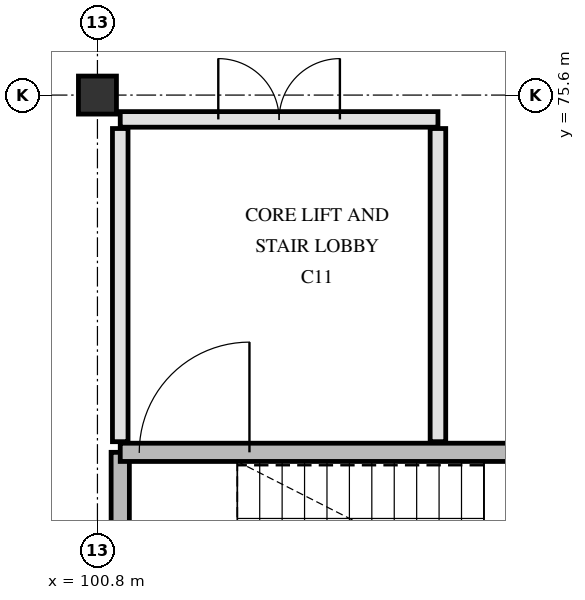
"""IFC4 building model, lengths in metres.
Left out: names, types, materials, properties, quantities, classifications, styles, units other than length and angle.
Written with IfcOpenShell. Run it as: python <this file> out.ifc"""

import sys

from ifc_helpers import new_model, si_unit, direction, frame, frame_2d, origin, origin_2d, place, context, subcontext, project, spatial, rectangle, extrude, element, fill, save


model = new_model("IFC4")
c1 = context("Model", 3, precision=1e-05, world=origin(), true_north=direction((0.0, 1.0)))
c2 = subcontext(c1, "Body", "Model", "MODEL_VIEW")
j1 = project(units=[si_unit("LENGTHUNIT", "METRE"), si_unit("PLANEANGLEUNIT", "RADIAN")], contexts=[c1])
p1 = place(None, origin())
s1 = spatial("IfcSite", under=j1, at=p1, CompositionType="ELEMENT")
p2 = place(p1, origin())
s2 = spatial("IfcBuilding", under=s1, at=p2, CompositionType="ELEMENT")
p3 = place(p2, frame((0.0, 0.0, 26.4)))
s3 = spatial("IfcBuildingStorey", under=s2, at=p3, CompositionType="ELEMENT", Elevation=26.4)
p4 = place(p3, frame((100.8, 75.6, 0.0), z_axis=(0.0, 0.0, 1.0), x_axis=(1.0, 0.0, 0.0)))
e1 = element("IfcColumn", 1, at=p4, inside=s3, PredefinedType="COLUMN", context=c2, shape_type="SweptSolid", body=[
    extrude(rectangle(XDim=0.5, YDim=0.5, at=origin_2d()), origin(), (0.0, 0.0, 1.0), 3.9),
])
p5 = place(p3, frame((101.1, 67.58, 0.0), z_axis=(0.0, 0.0, 1.0), x_axis=(0.0, 1.0, 0.0)))
e2 = element("IfcWall", 2, at=p5, inside=s3, PredefinedType="SHEAR", context=c2, shape_type="SweptSolid", body=[
    extrude(rectangle(XDim=3.32, YDim=0.24, at=frame_2d((1.66, 0.0))), origin(), (0.0, 0.0, 1.0), 3.62),
])
p6 = place(p3, frame((101.1, 70.9, 0.0), z_axis=(0.0, 0.0, 1.0), x_axis=(1.0, 0.0, 0.0)))
e3 = element("IfcWall", 3, at=p6, inside=s3, PredefinedType="SHEAR", context=c2, shape_type="SweptSolid", body=[
    extrude(rectangle(XDim=7.82, YDim=0.24, at=frame_2d((3.91, 0.0))), origin(), (0.0, 0.0, 1.0), 3.62),
])
p7 = place(p6, frame((0.25, 0.0, 0.0)))
e4 = element("IfcOpeningElement", 4, at=p7, cuts=e3, PredefinedType="OPENING", context=c2, shape_type="SweptSolid", body=[
    extrude(rectangle(XDim=1.45, YDim=2.2, at=frame_2d((0.725, 1.1))), frame((0.0, 0.13, 0.0), z_axis=(0.0, -1.0, 0.0), x_axis=(1.0, 0.0, 0.0)), (0.0, 0.0, 1.0), 0.26),
])
for number, where, z_axis, x_axis in (
    (5, (105.28, 71.04, 0.0), (0.0, 0.0, 1.0), (0.0, 1.0, 0.0)),
    (6, (101.1, 71.04, 0.0), (0.0, 0.0, 1.0), (0.0, 1.0, 0.0)),
):
    element("IfcWall", number, at=place(p3, frame(where, z_axis=z_axis, x_axis=x_axis)), inside=s3, PredefinedType="PARTITIONING", context=c2, shape_type="SweptSolid", body=[
        extrude(rectangle(XDim=4.12, YDim=0.205, at=frame_2d((2.06, 0.0))), origin(), (0.0, 0.0, 1.0), 3.61),
    ])
p8 = place(p3, frame((101.1, 75.28, 0.0), z_axis=(0.0, 0.0, 1.0), x_axis=(1.0, 0.0, 0.0)))
e7 = element("IfcWall", 7, at=p8, inside=s3, PredefinedType="PARTITIONING", context=c2, shape_type="SweptSolid", body=[
    extrude(rectangle(XDim=4.18, YDim=0.205, at=frame_2d((2.09, 0.0))), origin(), (0.0, 0.0, 1.0), 3.61),
])
p9 = place(p8, frame((1.29, 0.0, 0.0)))
e8 = element("IfcOpeningElement", 8, at=p9, cuts=e7, PredefinedType="OPENING", context=c2, shape_type="SweptSolid", body=[
    extrude(rectangle(XDim=1.6, YDim=2.25, at=frame_2d((0.8, 1.125))), frame((0.0, 0.113, 0.0), z_axis=(0.0, -1.0, 0.0), x_axis=(1.0, 0.0, 0.0)), (0.0, 0.0, 1.0), 0.225),
])
p10 = place(p7, origin())
e9 = element("IfcDoor", 9, at=p10, inside=s3, OperationType="SINGLE_SWING_RIGHT", PredefinedType="DOOR", context=c2, shape_type="SweptSolid", body=[
    extrude(rectangle(XDim=1.45, YDim=2.2, at=frame_2d((0.725, 1.1))), frame((0.0, 0.025, 0.0), z_axis=(0.0, -1.0, 0.0), x_axis=(1.0, 0.0, 0.0)), (0.0, 0.0, 1.0), 0.05),
])
fill(e4, e9)
p11 = place(p9, origin())
e10 = element("IfcDoor", 10, at=p11, inside=s3, OperationType="DOUBLE_SWING_LEFT", PredefinedType="DOOR", context=c2, shape_type="SweptSolid", body=[
    extrude(rectangle(XDim=1.6, YDim=2.25, at=frame_2d((0.8, 1.125))), frame((0.0, 0.025, 0.0), z_axis=(0.0, -1.0, 0.0), x_axis=(1.0, 0.0, 0.0)), (0.0, 0.0, 1.0), 0.05),
])
fill(e8, e10)
save(model, sys.argv[1])
